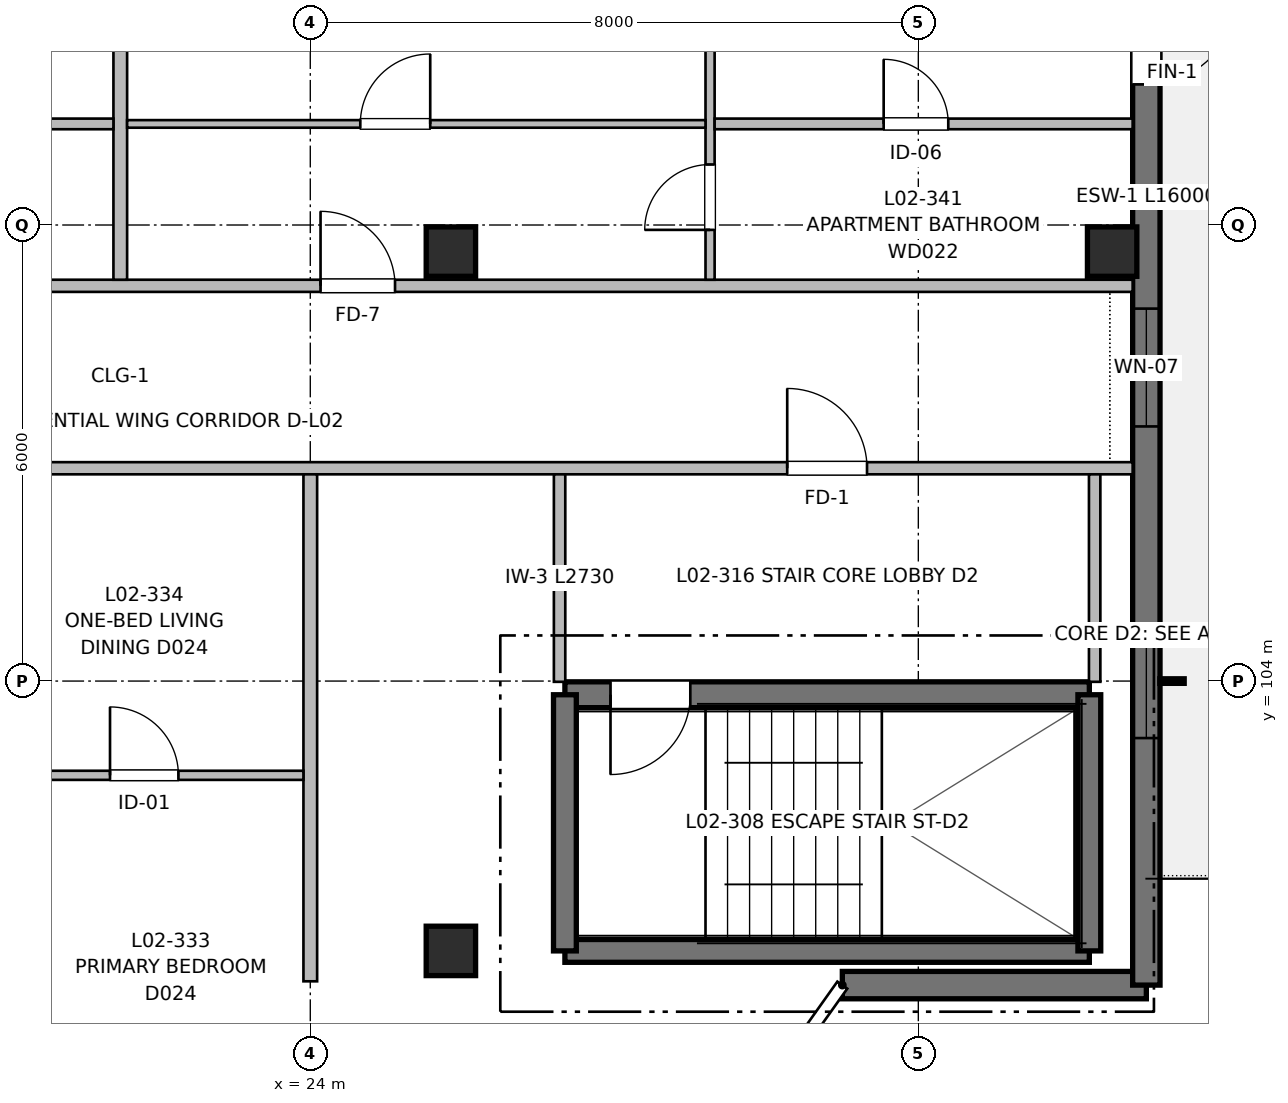
"""IFC4 building model, lengths in metres.
Left out: names, types, materials, properties, quantities, classifications, styles, units other than length and angle.
Written with IfcOpenShell. Run it as: python <this file> out.ifc"""

import sys

from ifc_helpers import new_model, si_unit, direction, frame, frame_2d, origin, origin_2d, place, context, subcontext, project, spatial, rectangle, extrude, element, fill, save


model = new_model("IFC4")
c1 = context("Model", 3, precision=1e-05, world=origin(), true_north=direction((0.0, 1.0)))
c2 = subcontext(c1, "Body", "Model", "MODEL_VIEW")
j1 = project(units=[si_unit("LENGTHUNIT", "METRE"), si_unit("PLANEANGLEUNIT", "RADIAN")], contexts=[c1])
p1 = place(None, origin())
s1 = spatial("IfcSite", under=j1, at=p1, CompositionType="ELEMENT")
p2 = place(p1, origin())
s2 = spatial("IfcBuilding", under=s1, at=p2, CompositionType="ELEMENT")
p3 = place(p2, frame((0.0, 0.0, 7.36)))
s3 = spatial("IfcBuildingStorey", under=s2, at=p3, CompositionType="ELEMENT", Elevation=7.36)
for number, where, z_axis, x_axis in (
    (1, (25.85, 100.45, 0.0), (0.0, 0.0, 1.0), (1.0, 0.0, 0.0)),
    (2, (25.85, 109.65, 0.0), (0.0, 0.0, 1.0), (1.0, 0.0, 0.0)),
    (3, (34.55, 109.65, 0.0), (0.0, 0.0, 1.0), (1.0, 0.0, 0.0)),
):
    element("IfcColumn", number, at=place(p3, frame(where, z_axis=z_axis, x_axis=x_axis)), inside=s3, PredefinedType="COLUMN", context=c2, shape_type="SweptSolid", body=[
        extrude(rectangle(XDim=0.65, YDim=0.65, at=origin_2d()), origin(), (0.0, 0.0, 1.0), 3.2),
    ])
p4 = place(p3, frame((27.35, 100.45, 0.0), z_axis=(0.0, 0.0, 1.0), x_axis=(1.0, 0.0, 0.0)))
e4 = element("IfcWall", 4, at=p4, inside=s3, PredefinedType="SHEAR", context=c2, shape_type="SweptSolid", body=[
    extrude(rectangle(XDim=6.9, YDim=0.3, at=frame_2d((3.45, 0.0))), origin(), (0.0, 0.0, 1.0), 3.2),
])
p5 = place(p3, frame((34.25, 103.82, 0.0), z_axis=(0.0, 0.0, 1.0), x_axis=(-1.0, 0.0, 0.0)))
e5 = element("IfcWall", 5, at=p5, inside=s3, PredefinedType="SHEAR", context=c2, shape_type="SweptSolid", body=[
    extrude(rectangle(XDim=6.9, YDim=0.34, at=frame_2d((3.45, 0.0))), origin(), (0.0, 0.0, 1.0), 3.2),
])
p6 = place(p5, frame((5.25, 0.0, 0.0)))
e6 = element("IfcOpeningElement", 6, at=p6, cuts=e5, PredefinedType="OPENING", context=c2, shape_type="SweptSolid", body=[
    extrude(rectangle(XDim=1.05, YDim=2.15, at=frame_2d((0.525, 1.075))), frame((0.0, 0.18, 0.0), z_axis=(0.0, -1.0, 0.0), x_axis=(1.0, 0.0, 0.0)), (0.0, 0.0, 1.0), 0.36),
])
for number, where, z_axis, x_axis in (
    (7, (27.35, 103.82, 0.0), (0.0, 0.0, 1.0), (0.0, -1.0, 0.0)),
    (8, (34.25, 100.45, 0.0), (0.0, 0.0, 1.0), (0.0, 1.0, 0.0)),
):
    element("IfcWall", number, at=place(p3, frame(where, z_axis=z_axis, x_axis=x_axis)), inside=s3, PredefinedType="SHEAR", context=c2, shape_type="SweptSolid", body=[
        extrude(rectangle(XDim=3.37, YDim=0.3, at=frame_2d((1.685, 0.0))), origin(), (0.0, 0.0, 1.0), 3.2),
    ])
p7 = place(p3, frame((35.0, 100.0, 0.0), z_axis=(0.0, 0.0, 1.0), x_axis=(-1.0, 0.0, 0.0)))
e9 = element("IfcWall", 9, at=p7, inside=s3, PredefinedType="SHEAR", context=c2, shape_type="SweptSolid", body=[
    extrude(rectangle(XDim=4.0, YDim=0.36, at=frame_2d((2.0, 0.0))), origin(), (0.0, 0.0, 1.0), 2.98),
])
p8 = place(p3, frame((35.0, 116.0, 0.0), z_axis=(0.0, 0.0, 1.0), x_axis=(0.0, -1.0, 0.0)))
e10 = element("IfcWall", 10, at=p8, inside=s3, PredefinedType="SHEAR", context=c2, shape_type="SweptSolid", body=[
    extrude(rectangle(XDim=16.0, YDim=0.36, at=frame_2d((8.0, 0.0))), origin(), (0.0, 0.0, 1.0), 2.98),
])
p9 = place(p8, frame((2.95, 0.0, 0.0)))
e11 = element("IfcOpeningElement", 11, at=p9, cuts=e10, PredefinedType="OPENING", context=c2, shape_type="SweptSolid", body=[
    extrude(rectangle(XDim=1.2, YDim=2.2, at=frame_2d((0.6, 1.1))), frame((0.0, 0.19, 0.0), z_axis=(0.0, -1.0, 0.0), x_axis=(1.0, 0.0, 0.0)), (0.0, 0.0, 1.0), 0.38),
])
p10 = place(p8, frame((7.1, 0.0, 0.82)))
e12 = element("IfcOpeningElement", 12, at=p10, cuts=e10, PredefinedType="OPENING", context=c2, shape_type="SweptSolid", body=[
    extrude(rectangle(XDim=1.55, YDim=1.4, at=frame_2d((0.775, 0.7))), frame((0.0, 0.19, 0.0), z_axis=(0.0, -1.0, 0.0), x_axis=(1.0, 0.0, 0.0)), (0.0, 0.0, 1.0), 0.38),
])
p11 = place(p8, frame((11.25, 0.0, 0.82)))
e13 = element("IfcOpeningElement", 13, at=p11, cuts=e10, PredefinedType="OPENING", context=c2, shape_type="SweptSolid", body=[
    extrude(rectangle(XDim=1.5, YDim=1.4, at=frame_2d((0.75, 0.7))), frame((0.0, 0.19, 0.0), z_axis=(0.0, -1.0, 0.0), x_axis=(1.0, 0.0, 0.0)), (0.0, 0.0, 1.0), 0.38),
])
p12 = place(p3, frame((17.2, 106.8, 0.0), z_axis=(0.0, 0.0, 1.0), x_axis=(1.0, 0.0, 0.0)))
e14 = element("IfcWall", 14, at=p12, inside=s3, PredefinedType="PARTITIONING", context=c2, shape_type="SweptSolid", body=[
    extrude(rectangle(XDim=17.62, YDim=0.16, at=frame_2d((8.81, 0.0))), origin(), (0.0, 0.0, 1.0), 2.935),
])
p13 = place(p12, frame((13.075, 0.0, 0.0)))
e15 = element("IfcOpeningElement", 15, at=p13, cuts=e14, PredefinedType="OPENING", context=c2, shape_type="SweptSolid", body=[
    extrude(rectangle(XDim=1.05, YDim=2.15, at=frame_2d((0.525, 1.075))), frame((0.0, 0.09, 0.0), z_axis=(0.0, -1.0, 0.0), x_axis=(1.0, 0.0, 0.0)), (0.0, 0.0, 1.0), 0.18),
])
p14 = place(p3, frame((8.18, 109.2, 0.0), z_axis=(0.0, 0.0, 1.0), x_axis=(1.0, 0.0, 0.0)))
e16 = element("IfcWall", 16, at=p14, inside=s3, PredefinedType="PARTITIONING", context=c2, shape_type="SweptSolid", body=[
    extrude(rectangle(XDim=26.64, YDim=0.16, at=frame_2d((13.32, 0.0))), origin(), (0.0, 0.0, 1.0), 2.935),
])
p15 = place(p14, frame((3.345, 0.0, 0.0)))
e17 = element("IfcOpeningElement", 17, at=p15, cuts=e16, PredefinedType="OPENING", context=c2, shape_type="SweptSolid", body=[
    extrude(rectangle(XDim=0.98, YDim=2.15, at=frame_2d((0.49, 1.075))), frame((0.0, 0.09, 0.0), z_axis=(0.0, -1.0, 0.0), x_axis=(1.0, 0.0, 0.0)), (0.0, 0.0, 1.0), 0.18),
])
p16 = place(p14, frame((15.955, 0.0, 0.0)))
e18 = element("IfcOpeningElement", 18, at=p16, cuts=e16, PredefinedType="OPENING", context=c2, shape_type="SweptSolid", body=[
    extrude(rectangle(XDim=0.98, YDim=2.15, at=frame_2d((0.49, 1.075))), frame((0.0, 0.09, 0.0), z_axis=(0.0, -1.0, 0.0), x_axis=(1.0, 0.0, 0.0)), (0.0, 0.0, 1.0), 0.18),
])
p17 = place(p3, frame((24.0, 100.05, 0.0), z_axis=(0.0, 0.0, 1.0), x_axis=(0.0, 1.0, 0.0)))
e19 = element("IfcWall", 19, at=p17, inside=s3, PredefinedType="PARTITIONING", context=c2, shape_type="SweptSolid", body=[
    extrude(rectangle(XDim=6.67, YDim=0.18, at=frame_2d((3.335, 0.0))), origin(), (0.0, 0.0, 1.0), 2.935),
])
for number, where, z_axis, x_axis in (
    (20, (27.28, 103.99, 0.0), (0.0, 0.0, 1.0), (0.0, 1.0, 0.0)),
    (21, (34.32, 103.99, 0.0), (0.0, 0.0, 1.0), (0.0, 1.0, 0.0)),
):
    element("IfcWall", number, at=place(p3, frame(where, z_axis=z_axis, x_axis=x_axis)), inside=s3, PredefinedType="PARTITIONING", context=c2, shape_type="SweptSolid", body=[
        extrude(rectangle(XDim=2.73, YDim=0.15, at=frame_2d((1.365, 0.0))), origin(), (0.0, 0.0, 1.0), 2.935),
    ])
p18 = place(p3, frame((19.72, 102.76, 0.0), z_axis=(0.0, 0.0, 1.0), x_axis=(1.0, 0.0, 0.0)))
e22 = element("IfcWall", 22, at=p18, inside=s3, PredefinedType="PARTITIONING", context=c2, shape_type="SweptSolid", body=[
    extrude(rectangle(XDim=4.19, YDim=0.12, at=frame_2d((2.095, 0.0))), origin(), (0.0, 0.0, 1.0), 2.935),
])
p19 = place(p18, frame((1.645, 0.0, 0.0)))
e23 = element("IfcOpeningElement", 23, at=p19, cuts=e22, PredefinedType="OPENING", context=c2, shape_type="SweptSolid", body=[
    extrude(rectangle(XDim=0.9, YDim=2.1, at=frame_2d((0.45, 1.05))), frame((0.0, 0.07, 0.0), z_axis=(0.0, -1.0, 0.0), x_axis=(1.0, 0.0, 0.0)), (0.0, 0.0, 1.0), 0.14),
])
p20 = place(p3, frame((21.5, 109.28, 0.0), z_axis=(0.0, 0.0, 1.0), x_axis=(0.0, 1.0, 0.0)))
e24 = element("IfcWall", 24, at=p20, inside=s3, PredefinedType="PARTITIONING", context=c2, shape_type="SweptSolid", body=[
    extrude(rectangle(XDim=6.59, YDim=0.18, at=frame_2d((3.295, 0.0))), origin(), (0.0, 0.0, 1.0), 2.67),
])
p21 = place(p3, frame((15.91, 111.33, 0.0), z_axis=(0.0, 0.0, 1.0), x_axis=(1.0, 0.0, 0.0)))
e25 = element("IfcWall", 25, at=p21, inside=s3, PredefinedType="PARTITIONING", context=c2, shape_type="SweptSolid", body=[
    extrude(rectangle(XDim=5.5, YDim=0.14, at=frame_2d((2.75, 0.0))), origin(), (0.0, 0.0, 1.0), 2.935),
])
p22 = place(p21, frame((2.224, 0.0, 0.0)))
e26 = element("IfcOpeningElement", 26, at=p22, cuts=e25, PredefinedType="OPENING", context=c2, shape_type="SweptSolid", body=[
    extrude(rectangle(XDim=0.85, YDim=2.05, at=frame_2d((0.425, 1.025))), frame((0.0, 0.08, 0.0), z_axis=(0.0, -1.0, 0.0), x_axis=(1.0, 0.0, 0.0)), (0.0, 0.0, 1.0), 0.16),
])
p23 = place(p3, frame((29.26, 109.28, 0.0), z_axis=(0.0, 0.0, 1.0), x_axis=(0.0, 1.0, 0.0)))
e27 = element("IfcWall", 27, at=p23, inside=s3, PredefinedType="PARTITIONING", context=c2, shape_type="SweptSolid", body=[
    extrude(rectangle(XDim=6.59, YDim=0.12, at=frame_2d((3.295, 0.0))), origin(), (0.0, 0.0, 1.0), 2.935),
])
p24 = place(p23, frame((0.656, 0.0, 0.0)))
e28 = element("IfcOpeningElement", 28, at=p24, cuts=e27, PredefinedType="OPENING", context=c2, shape_type="SweptSolid", body=[
    extrude(rectangle(XDim=0.86, YDim=2.1, at=frame_2d((0.43, 1.05))), frame((0.0, 0.07, 0.0), z_axis=(0.0, -1.0, 0.0), x_axis=(1.0, 0.0, 0.0)), (0.0, 0.0, 1.0), 0.14),
])
p25 = place(p23, frame((4.093, 0.0, 0.0)))
e29 = element("IfcOpeningElement", 29, at=p25, cuts=e27, PredefinedType="OPENING", context=c2, shape_type="SweptSolid", body=[
    extrude(rectangle(XDim=0.9, YDim=2.1, at=frame_2d((0.45, 1.05))), frame((0.0, 0.07, 0.0), z_axis=(0.0, -1.0, 0.0), x_axis=(1.0, 0.0, 0.0)), (0.0, 0.0, 1.0), 0.14),
])
p26 = place(p3, frame((29.32, 111.33, 0.0), z_axis=(0.0, 0.0, 1.0), x_axis=(1.0, 0.0, 0.0)))
e30 = element("IfcWall", 30, at=p26, inside=s3, PredefinedType="PARTITIONING", context=c2, shape_type="SweptSolid", body=[
    extrude(rectangle(XDim=5.5, YDim=0.14, at=frame_2d((2.75, 0.0))), origin(), (0.0, 0.0, 1.0), 2.935),
])
p27 = place(p26, frame((2.224, 0.0, 0.0)))
e31 = element("IfcOpeningElement", 31, at=p27, cuts=e30, PredefinedType="OPENING", context=c2, shape_type="SweptSolid", body=[
    extrude(rectangle(XDim=0.85, YDim=2.05, at=frame_2d((0.425, 1.025))), frame((0.0, 0.08, 0.0), z_axis=(0.0, -1.0, 0.0), x_axis=(1.0, 0.0, 0.0)), (0.0, 0.0, 1.0), 0.16),
])
p28 = place(p3, frame((21.59, 111.33, 0.0), z_axis=(0.0, 0.0, 1.0), x_axis=(1.0, 0.0, 0.0)))
e32 = element("IfcWall", 32, at=p28, inside=s3, PredefinedType="PARTITIONING", context=c2, shape_type="SweptSolid", body=[
    extrude(rectangle(XDim=7.61, YDim=0.1, at=frame_2d((3.805, 0.0))), origin(), (0.0, 0.0, 1.0), 2.935),
])
p29 = place(p28, frame((3.068, 0.0, 0.0)))
e33 = element("IfcOpeningElement", 33, at=p29, cuts=e32, PredefinedType="OPENING", context=c2, shape_type="SweptSolid", body=[
    extrude(rectangle(XDim=0.92, YDim=2.1, at=frame_2d((0.46, 1.05))), frame((0.0, 0.06, 0.0), z_axis=(0.0, -1.0, 0.0), x_axis=(1.0, 0.0, 0.0)), (0.0, 0.0, 1.0), 0.12),
])
p30 = place(p6, origin())
e34 = element("IfcDoor", 34, at=p30, inside=s3, OperationType="SINGLE_SWING_RIGHT", PredefinedType="DOOR", context=c2, shape_type="SweptSolid", body=[
    extrude(rectangle(XDim=1.05, YDim=2.15, at=frame_2d((0.525, 1.075))), frame((0.0, 0.025, 0.0), z_axis=(0.0, -1.0, 0.0), x_axis=(1.0, 0.0, 0.0)), (0.0, 0.0, 1.0), 0.05),
])
fill(e6, e34)
p31 = place(p9, origin())
e35 = element("IfcDoor", 35, at=p31, inside=s3, OperationType="SINGLE_SWING_LEFT", PredefinedType="DOOR", context=c2, shape_type="SweptSolid", body=[
    extrude(rectangle(XDim=1.2, YDim=2.2, at=frame_2d((0.6, 1.1))), frame((0.0, 0.025, 0.0), z_axis=(0.0, -1.0, 0.0), x_axis=(1.0, 0.0, 0.0)), (0.0, 0.0, 1.0), 0.05),
])
fill(e11, e35)
p32 = place(p10, origin())
e36 = element("IfcWindow", 36, at=p32, inside=s3, PartitioningType="SINGLE_PANEL", PredefinedType="WINDOW", context=c2, shape_type="SweptSolid", body=[
    extrude(rectangle(XDim=1.55, YDim=1.4, at=frame_2d((0.775, 0.7))), frame((0.0, 0.03, 0.0), z_axis=(0.0, -1.0, 0.0), x_axis=(1.0, 0.0, 0.0)), (0.0, 0.0, 1.0), 0.06),
])
fill(e12, e36)
p33 = place(p11, origin())
e37 = element("IfcWindow", 37, at=p33, inside=s3, PartitioningType="SINGLE_PANEL", PredefinedType="WINDOW", context=c2, shape_type="SweptSolid", body=[
    extrude(rectangle(XDim=1.5, YDim=1.4, at=frame_2d((0.75, 0.7))), frame((0.0, 0.03, 0.0), z_axis=(0.0, -1.0, 0.0), x_axis=(1.0, 0.0, 0.0)), (0.0, 0.0, 1.0), 0.06),
])
fill(e13, e37)
p34 = place(p13, origin())
e38 = element("IfcDoor", 38, at=p34, inside=s3, OperationType="SINGLE_SWING_LEFT", PredefinedType="DOOR", context=c2, shape_type="SweptSolid", body=[
    extrude(rectangle(XDim=1.05, YDim=2.15, at=frame_2d((0.525, 1.075))), frame((0.0, 0.025, 0.0), z_axis=(0.0, -1.0, 0.0), x_axis=(1.0, 0.0, 0.0)), (0.0, 0.0, 1.0), 0.05),
])
fill(e15, e38)
p35 = place(p19, origin())
e39 = element("IfcDoor", 39, at=p35, inside=s3, OperationType="SINGLE_SWING_LEFT", PredefinedType="DOOR", context=c2, shape_type="SweptSolid", body=[
    extrude(rectangle(XDim=0.9, YDim=2.1, at=frame_2d((0.45, 1.05))), frame((0.0, 0.025, 0.0), z_axis=(0.0, -1.0, 0.0), x_axis=(1.0, 0.0, 0.0)), (0.0, 0.0, 1.0), 0.05),
])
fill(e23, e39)
p36 = place(p16, origin())
e40 = element("IfcDoor", 40, at=p36, inside=s3, OperationType="SINGLE_SWING_LEFT", PredefinedType="DOOR", context=c2, shape_type="SweptSolid", body=[
    extrude(rectangle(XDim=0.98, YDim=2.15, at=frame_2d((0.49, 1.075))), frame((0.0, 0.025, 0.0), z_axis=(0.0, -1.0, 0.0), x_axis=(1.0, 0.0, 0.0)), (0.0, 0.0, 1.0), 0.05),
])
fill(e18, e40)
p37 = place(p29, origin())
e41 = element("IfcDoor", 41, at=p37, inside=s3, OperationType="SINGLE_SWING_RIGHT", PredefinedType="DOOR", context=c2, shape_type="SweptSolid", body=[
    extrude(rectangle(XDim=0.92, YDim=2.1, at=frame_2d((0.46, 1.05))), frame((0.0, 0.025, 0.0), z_axis=(0.0, -1.0, 0.0), x_axis=(1.0, 0.0, 0.0)), (0.0, 0.0, 1.0), 0.05),
])
fill(e33, e41)
p38 = place(p24, origin())
e42 = element("IfcDoor", 42, at=p38, inside=s3, OperationType="SINGLE_SWING_LEFT", PredefinedType="DOOR", context=c2, shape_type="SweptSolid", body=[
    extrude(rectangle(XDim=0.86, YDim=2.1, at=frame_2d((0.43, 1.05))), frame((0.0, 0.025, 0.0), z_axis=(0.0, -1.0, 0.0), x_axis=(1.0, 0.0, 0.0)), (0.0, 0.0, 1.0), 0.05),
])
fill(e28, e42)
p39 = place(p27, origin())
e43 = element("IfcDoor", 43, at=p39, inside=s3, OperationType="SINGLE_SWING_LEFT", PredefinedType="DOOR", context=c2, shape_type="SweptSolid", body=[
    extrude(rectangle(XDim=0.85, YDim=2.05, at=frame_2d((0.425, 1.025))), frame((0.0, 0.025, 0.0), z_axis=(0.0, -1.0, 0.0), x_axis=(1.0, 0.0, 0.0)), (0.0, 0.0, 1.0), 0.05),
])
fill(e31, e43)
save(model, sys.argv[1])
